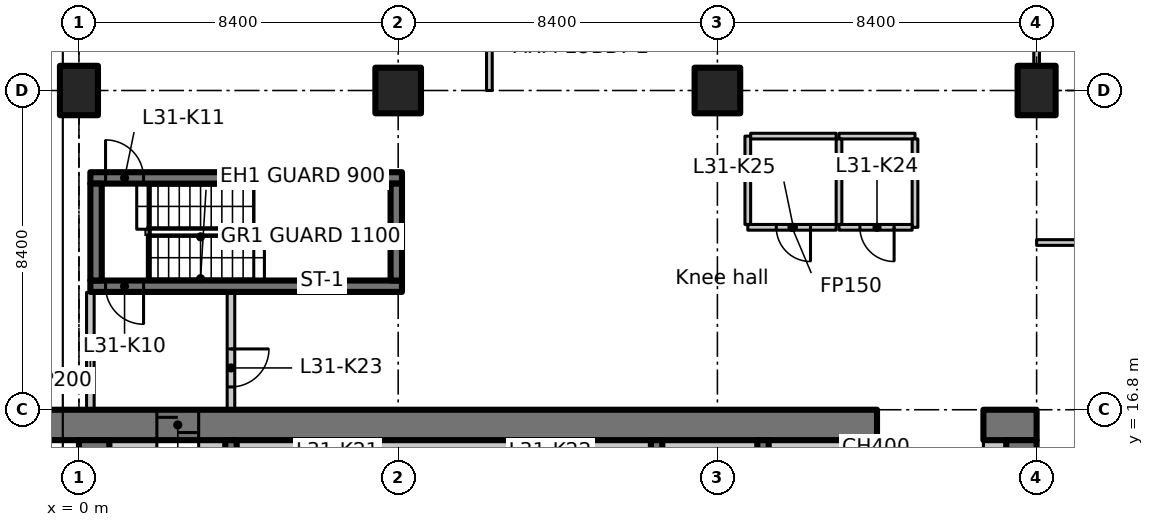
"""IFC4 building model, lengths in metres.
Left out: names, types, materials, properties, quantities, classifications, styles, units other than length and angle.
Written with IfcOpenShell. Run it as: python <this file> out.ifc"""

import sys

from ifc_helpers import new_model, si_unit, direction, frame, frame_2d, origin, origin_2d, place, context, subcontext, project, spatial, polyline, rectangle, outline, extrude, element, fill, save


model = new_model("IFC4")
c1 = context("Model", 3, precision=1e-05, world=origin(), true_north=direction((0.0, 1.0)))
c2 = subcontext(c1, "Body", "Model", "MODEL_VIEW")
j1 = project(units=[si_unit("LENGTHUNIT", "METRE"), si_unit("PLANEANGLEUNIT", "RADIAN")], contexts=[c1])
p1 = place(None, origin())
s1 = spatial("IfcSite", under=j1, at=p1, CompositionType="ELEMENT")
p2 = place(p1, origin())
s2 = spatial("IfcBuilding", under=s1, at=p2, CompositionType="ELEMENT")
p3 = place(p2, frame((0.0, 0.0, 127.7)))
s3 = spatial("IfcBuildingStorey", under=s2, at=p3, CompositionType="ELEMENT", Elevation=127.7)
p4 = place(p3, frame((0.0, 25.2, 0.0), z_axis=(0.0, 0.0, 1.0), x_axis=(1.0, 0.0, 0.0)))
e1 = element("IfcColumn", 1, at=p4, inside=s3, PredefinedType="COLUMN", context=c2, shape_type="SweptSolid", body=[
    extrude(rectangle(XDim=1.0, YDim=1.3, at=origin_2d()), origin(), (0.0, 0.0, 1.0), 3.35),
])
for number, where, z_axis, x_axis in (
    (2, (8.4, 25.2, 0.0), (0.0, 0.0, 1.0), (1.0, 0.0, 0.0)),
    (3, (16.8, 25.2, 0.0), (0.0, 0.0, 1.0), (1.0, 0.0, 0.0)),
):
    element("IfcColumn", number, at=place(p3, frame(where, z_axis=z_axis, x_axis=x_axis)), inside=s3, PredefinedType="COLUMN", context=c2, shape_type="SweptSolid", body=[
        extrude(rectangle(XDim=1.2, YDim=1.2, at=origin_2d()), origin(), (0.0, 0.0, 1.0), 3.35),
    ])
p5 = place(p3, frame((25.2, 25.2, 0.0), z_axis=(0.0, 0.0, 1.0), x_axis=(1.0, 0.0, 0.0)))
e4 = element("IfcColumn", 4, at=p5, inside=s3, PredefinedType="COLUMN", context=c2, shape_type="SweptSolid", body=[
    extrude(rectangle(XDim=1.0, YDim=1.3, at=origin_2d()), origin(), (0.0, 0.0, 1.0), 3.35),
])
p6 = place(p3, frame((-1.1, 16.4, 0.0), z_axis=(0.0, 0.0, 1.0), x_axis=(1.0, 0.0, 0.0)))
e5 = element("IfcWall", 5, at=p6, inside=s3, PredefinedType="SHEAR", context=c2, shape_type="SweptSolid", body=[
    extrude(rectangle(XDim=22.1, YDim=0.8, at=frame_2d((11.05, 0.0))), origin(), (0.0, 0.0, 1.0), 3.35),
])
p7 = place(p6, frame((3.15, 0.0, 0.0)))
e6 = element("IfcOpeningElement", 6, at=p7, cuts=e5, PredefinedType="OPENING", context=c2, shape_type="SweptSolid", body=[
    extrude(rectangle(XDim=1.1, YDim=2.3, at=frame_2d((0.55, 1.15))), frame((0.0, 0.41, 0.0), z_axis=(0.0, -1.0, 0.0), x_axis=(1.0, 0.0, 0.0)), (0.0, 0.0, 1.0), 0.82),
])
p8 = place(p3, frame((23.8, 16.4, 0.0), z_axis=(0.0, 0.0, 1.0), x_axis=(1.0, 0.0, 0.0)))
e7 = element("IfcWall", 7, at=p8, inside=s3, PredefinedType="SHEAR", context=c2, shape_type="SweptSolid", body=[
    extrude(rectangle(XDim=1.4, YDim=0.8, at=frame_2d((0.7, 0.0))), origin(), (0.0, 0.0, 1.0), 3.35),
])
p9 = place(p3, frame((0.4, 7.136, 0.0), z_axis=(0.0, 0.0, 1.0), x_axis=(0.0, 1.0, 0.0)))
e8 = element("IfcWall", 8, at=p9, inside=s3, PredefinedType="SHEAR", context=c2, shape_type="SweptSolid", body=[
    extrude(rectangle(XDim=8.864, YDim=0.8, at=frame_2d((4.432, 0.0))), origin(), (0.0, 0.0, 1.0), 3.35),
])
p10 = place(p3, frame((24.8, 12.6, 0.0), z_axis=(0.0, 0.0, 1.0), x_axis=(0.0, 1.0, 0.0)))
e9 = element("IfcWall", 9, at=p10, inside=s3, PredefinedType="SHEAR", context=c2, shape_type="SweptSolid", body=[
    extrude(rectangle(XDim=3.4, YDim=0.8, at=frame_2d((1.7, 0.0))), origin(), (0.0, 0.0, 1.0), 3.35),
])
p11 = place(p3, frame((0.8, 15.8, 0.0), z_axis=(0.0, 0.0, 1.0), x_axis=(1.0, 0.0, 0.0)))
e10 = element("IfcWall", 10, at=p11, inside=s3, PredefinedType="PARTITIONING", context=c2, shape_type="SweptSolid", body=[
    extrude(rectangle(XDim=1.25, YDim=0.4, at=frame_2d((0.625, 0.0))), origin(), (0.0, 0.0, 1.0), 3.35),
])
p12 = place(p3, frame((23.8, 15.8, 0.0), z_axis=(0.0, 0.0, 1.0), x_axis=(1.0, 0.0, 0.0)))
e11 = element("IfcWall", 11, at=p12, inside=s3, PredefinedType="PARTITIONING", context=c2, shape_type="SweptSolid", body=[
    extrude(rectangle(XDim=0.6, YDim=0.4, at=frame_2d((0.3, 0.0))), origin(), (0.0, 0.0, 1.0), 3.35),
])
for number, where, z_axis, x_axis in (
    (12, (4.0, 12.95, 0.0), (0.0, 0.0, 1.0), (0.0, 1.0, 0.0)),
    (13, (15.2, 12.95, 0.0), (0.0, 0.0, 1.0), (0.0, 1.0, 0.0)),
    (14, (18.0, 12.95, 0.0), (0.0, 0.0, 1.0), (0.0, 1.0, 0.0)),
    (15, (20.8, 12.95, 0.0), (0.0, 0.0, 1.0), (0.0, 1.0, 0.0)),
):
    element("IfcWall", number, at=place(p3, frame(where, z_axis=z_axis, x_axis=x_axis)), inside=s3, PredefinedType="SHEAR", context=c2, shape_type="SweptSolid", body=[
        extrude(rectangle(XDim=3.05, YDim=0.3, at=frame_2d((1.525, 0.0))), origin(), (0.0, 0.0, 1.0), 3.35),
    ])
p13 = place(p3, frame((8.5, 20.05, 0.0), z_axis=(0.0, 0.0, 1.0), x_axis=(-1.0, 0.0, 0.0)))
e16 = element("IfcWall", 16, at=p13, inside=s3, PredefinedType="SHEAR", context=c2, shape_type="SweptSolid", body=[
    extrude(rectangle(XDim=8.2, YDim=0.3, at=frame_2d((4.1, 0.0))), origin(), (0.0, 0.0, 1.0), 3.35),
])
p14 = place(p13, frame((6.8, 0.0, 0.0)))
e17 = element("IfcOpeningElement", 17, at=p14, cuts=e16, PredefinedType="OPENING", context=c2, shape_type="SweptSolid", body=[
    extrude(rectangle(XDim=1.0, YDim=2.1, at=frame_2d((0.5, 1.05))), frame((0.0, 0.16, 0.0), z_axis=(0.0, -1.0, 0.0), x_axis=(1.0, 0.0, 0.0)), (0.0, 0.0, 1.0), 0.32),
])
p15 = place(p3, frame((0.3, 22.9, 0.0), z_axis=(0.0, 0.0, 1.0), x_axis=(1.0, 0.0, 0.0)))
e18 = element("IfcWall", 18, at=p15, inside=s3, PredefinedType="SHEAR", context=c2, shape_type="SweptSolid", body=[
    extrude(rectangle(XDim=8.2, YDim=0.3, at=frame_2d((4.1, 0.0))), origin(), (0.0, 0.0, 1.0), 3.35),
])
p16 = place(p15, frame((0.4, 0.0, 0.0)))
e19 = element("IfcOpeningElement", 19, at=p16, cuts=e18, PredefinedType="OPENING", context=c2, shape_type="SweptSolid", body=[
    extrude(rectangle(XDim=1.0, YDim=2.1, at=frame_2d((0.5, 1.05))), frame((0.0, 0.16, 0.0), z_axis=(0.0, -1.0, 0.0), x_axis=(1.0, 0.0, 0.0)), (0.0, 0.0, 1.0), 0.32),
])
for number, where, z_axis, x_axis in (
    (20, (0.45, 20.2, 0.0), (0.0, 0.0, 1.0), (0.0, 1.0, 0.0)),
    (21, (8.35, 20.2, 0.0), (0.0, 0.0, 1.0), (0.0, 1.0, 0.0)),
):
    element("IfcWall", number, at=place(p3, frame(where, z_axis=z_axis, x_axis=x_axis)), inside=s3, PredefinedType="SHEAR", context=c2, shape_type="SweptSolid", body=[
        extrude(rectangle(XDim=2.55, YDim=0.3, at=frame_2d((1.275, 0.0))), origin(), (0.0, 0.0, 1.0), 3.35),
    ])
p17 = place(p3, frame((0.3, 16.812, 0.0), z_axis=(0.0, 0.0, 1.0), x_axis=(0.0, 1.0, 0.0)))
e22 = element("IfcWall", 22, at=p17, inside=s3, PredefinedType="PARTITIONING", context=c2, shape_type="SweptSolid", body=[
    extrude(rectangle(XDim=3.076, YDim=0.2, at=frame_2d((1.538, 0.0))), origin(), (0.0, 0.0, 1.0), 2.98),
])
p18 = place(p3, frame((4.0, 19.888, 0.0), z_axis=(0.0, 0.0, 1.0), x_axis=(0.0, -1.0, 0.0)))
e23 = element("IfcWall", 23, at=p18, inside=s3, PredefinedType="PARTITIONING", context=c2, shape_type="SweptSolid", body=[
    extrude(rectangle(XDim=3.076, YDim=0.2, at=frame_2d((1.538, 0.0))), origin(), (0.0, 0.0, 1.0), 3.35),
])
p19 = place(p18, frame((1.488, 0.0, 0.0)))
e24 = element("IfcOpeningElement", 24, at=p19, cuts=e23, PredefinedType="OPENING", context=c2, shape_type="SweptSolid", body=[
    extrude(rectangle(XDim=1.0, YDim=2.1, at=frame_2d((0.5, 1.05))), frame((0.0, 0.11, 0.0), z_axis=(0.0, -1.0, 0.0), x_axis=(1.0, 0.0, 0.0)), (0.0, 0.0, 1.0), 0.22),
])
p20 = place(p3, frame((20.0, 24.0, 0.0), z_axis=(0.0, 0.0, 1.0), x_axis=(1.0, 0.0, 0.0)))
e25 = element("IfcWall", 25, at=p20, inside=s3, PredefinedType="PARTITIONING", context=c2, shape_type="SweptSolid", body=[
    extrude(rectangle(XDim=2.0, YDim=0.15, at=frame_2d((1.0, 0.0))), origin(), (0.0, 0.0, 1.0), 3.35),
])
p21 = place(p3, frame((22.0, 23.925, 0.0), z_axis=(0.0, 0.0, 1.0), x_axis=(0.0, -1.0, 0.0)))
e26 = element("IfcWall", 26, at=p21, inside=s3, PredefinedType="PARTITIONING", context=c2, shape_type="SweptSolid", body=[
    extrude(rectangle(XDim=2.325, YDim=0.15, at=frame_2d((1.163, 0.0))), origin(), (0.0, 0.0, 1.0), 3.35),
])
p22 = place(p3, frame((21.925, 21.6, 0.0), z_axis=(0.0, 0.0, 1.0), x_axis=(-1.0, 0.0, 0.0)))
e27 = element("IfcWall", 27, at=p22, inside=s3, PredefinedType="PARTITIONING", context=c2, shape_type="SweptSolid", body=[
    extrude(rectangle(XDim=1.925, YDim=0.15, at=frame_2d((0.962, 0.0))), origin(), (0.0, 0.0, 1.0), 3.35),
])
p23 = place(p22, frame((0.475, 0.0, 0.0)))
e28 = element("IfcOpeningElement", 28, at=p23, cuts=e27, PredefinedType="OPENING", context=c2, shape_type="SweptSolid", body=[
    extrude(rectangle(XDim=0.9, YDim=2.1, at=frame_2d((0.45, 1.05))), frame((0.0, 0.085, 0.0), z_axis=(0.0, -1.0, 0.0), x_axis=(1.0, 0.0, 0.0)), (0.0, 0.0, 1.0), 0.17),
])
p24 = place(p3, frame((20.0, 21.675, 0.0), z_axis=(0.0, 0.0, 1.0), x_axis=(0.0, 1.0, 0.0)))
e29 = element("IfcWall", 29, at=p24, inside=s3, PredefinedType="PARTITIONING", context=c2, shape_type="SweptSolid", body=[
    extrude(rectangle(XDim=2.25, YDim=0.15, at=frame_2d((1.125, 0.0))), origin(), (0.0, 0.0, 1.0), 3.35),
])
p25 = place(p3, frame((19.925, 21.6, 0.0), z_axis=(0.0, 0.0, 1.0), x_axis=(-1.0, 0.0, 0.0)))
e30 = element("IfcWall", 30, at=p25, inside=s3, PredefinedType="PARTITIONING", context=c2, shape_type="SweptSolid", body=[
    extrude(rectangle(XDim=2.325, YDim=0.15, at=frame_2d((1.163, 0.0))), origin(), (0.0, 0.0, 1.0), 3.35),
])
p26 = place(p25, frame((0.675, 0.0, 0.0)))
e31 = element("IfcOpeningElement", 31, at=p26, cuts=e30, PredefinedType="OPENING", context=c2, shape_type="SweptSolid", body=[
    extrude(rectangle(XDim=0.9, YDim=2.1, at=frame_2d((0.45, 1.05))), frame((0.0, 0.085, 0.0), z_axis=(0.0, -1.0, 0.0), x_axis=(1.0, 0.0, 0.0)), (0.0, 0.0, 1.0), 0.17),
])
p27 = place(p3, frame((17.6, 21.675, 0.0), z_axis=(0.0, 0.0, 1.0), x_axis=(0.0, 1.0, 0.0)))
e32 = element("IfcWall", 32, at=p27, inside=s3, PredefinedType="PARTITIONING", context=c2, shape_type="SweptSolid", body=[
    extrude(rectangle(XDim=2.325, YDim=0.15, at=frame_2d((1.163, 0.0))), origin(), (0.0, 0.0, 1.0), 3.35),
])
p28 = place(p3, frame((17.675, 24.0, 0.0), z_axis=(0.0, 0.0, 1.0), x_axis=(1.0, 0.0, 0.0)))
e33 = element("IfcWall", 33, at=p28, inside=s3, PredefinedType="PARTITIONING", context=c2, shape_type="SweptSolid", body=[
    extrude(rectangle(XDim=2.25, YDim=0.15, at=frame_2d((1.125, 0.0))), origin(), (0.0, 0.0, 1.0), 3.35),
])
p29 = place(p3, frame((3.15, 15.8, 0.0), z_axis=(0.0, 0.0, 1.0), x_axis=(1.0, 0.0, 0.0)))
e34 = element("IfcWall", 34, at=p29, inside=s3, PredefinedType="PARTITIONING", context=c2, shape_type="SweptSolid", body=[
    extrude(rectangle(XDim=0.7, YDim=0.4, at=frame_2d((0.35, 0.0))), origin(), (0.0, 0.0, 1.0), 3.35),
])
p30 = place(p3, frame((4.15, 15.8, 0.0), z_axis=(0.0, 0.0, 1.0), x_axis=(1.0, 0.0, 0.0)))
e35 = element("IfcWall", 35, at=p30, inside=s3, PredefinedType="PARTITIONING", context=c2, shape_type="SweptSolid", body=[
    extrude(rectangle(XDim=10.9, YDim=0.4, at=frame_2d((5.45, 0.0))), origin(), (0.0, 0.0, 1.0), 3.35),
])
for number, where, z_axis, x_axis in (
    (36, (15.35, 15.8, 0.0), (0.0, 0.0, 1.0), (1.0, 0.0, 0.0)),
    (37, (18.15, 15.8, 0.0), (0.0, 0.0, 1.0), (1.0, 0.0, 0.0)),
):
    element("IfcWall", number, at=place(p3, frame(where, z_axis=z_axis, x_axis=x_axis)), inside=s3, PredefinedType="PARTITIONING", context=c2, shape_type="SweptSolid", body=[
        extrude(rectangle(XDim=2.5, YDim=0.4, at=frame_2d((1.25, 0.0))), origin(), (0.0, 0.0, 1.0), 3.35),
    ])
p31 = place(p3, frame((20.95, 15.8, 0.0), z_axis=(0.0, 0.0, 1.0), x_axis=(1.0, 0.0, 0.0)))
e38 = element("IfcWall", 38, at=p31, inside=s3, PredefinedType="PARTITIONING", context=c2, shape_type="SweptSolid", body=[
    extrude(rectangle(XDim=0.05, YDim=0.4, at=frame_2d((0.025, 0.0))), origin(), (0.0, 0.0, 1.0), 3.35),
])
p32 = place(p3, frame((25.2, 21.2, 0.0), z_axis=(0.0, 0.0, 1.0), x_axis=(1.0, 0.0, 0.0)))
e39 = element("IfcWall", 39, at=p32, inside=s3, PredefinedType="PARTITIONING", context=c2, shape_type="SweptSolid", body=[
    extrude(rectangle(XDim=4.2, YDim=0.15, at=frame_2d((2.1, 0.0))), origin(), (0.0, 0.0, 1.0), 3.33),
])
p33 = place(p3, frame((25.2, 31.0, 0.0), z_axis=(0.0, 0.0, 1.0), x_axis=(0.0, -1.0, 0.0)))
e40 = element("IfcWall", 40, at=p33, inside=s3, PredefinedType="PARTITIONING", context=c2, shape_type="SweptSolid", body=[
    extrude(outline(polyline([(0.0, 0.0), (5.13, 0.0), (5.13, 2.98), (0.0, 2.98), (0.0, 0.0)])), frame((0.0, 0.075, 0.0), z_axis=(0.0, -1.0, 0.0), x_axis=(1.0, 0.0, 0.0)), (0.0, 0.0, 1.0), 0.15),
])
p34 = place(p33, frame((1.93, 0.0, 0.0)))
e41 = element("IfcOpeningElement", 41, at=p34, cuts=e40, PredefinedType="OPENING", context=c2, shape_type="SweptSolid", body=[
    extrude(rectangle(XDim=1.1, YDim=2.1, at=frame_2d((0.55, 1.05))), frame((0.0, 0.085, 0.0), z_axis=(0.0, -1.0, 0.0), x_axis=(1.0, 0.0, 0.0)), (0.0, 0.0, 1.0), 0.17),
])
p35 = place(p3, frame((10.8, 25.2, 0.0), z_axis=(0.0, 0.0, 1.0), x_axis=(0.0, 1.0, 0.0)))
e42 = element("IfcWall", 42, at=p35, inside=s3, PredefinedType="PARTITIONING", context=c2, shape_type="SweptSolid", body=[
    extrude(rectangle(XDim=8.4, YDim=0.15, at=frame_2d((4.2, 0.0))), origin(), (0.0, 0.0, 1.0), 3.33),
])
p36 = place(p35, frame((3.3, 0.0, 0.0)))
e43 = element("IfcOpeningElement", 43, at=p36, cuts=e42, PredefinedType="OPENING", context=c2, shape_type="SweptSolid", body=[
    extrude(rectangle(XDim=1.6, YDim=2.1, at=frame_2d((0.8, 1.05))), frame((0.0, 0.085, 0.0), z_axis=(0.0, -1.0, 0.0), x_axis=(1.0, 0.0, 0.0)), (0.0, 0.0, 1.0), 0.17),
])
p37 = place(p7, origin())
e44 = element("IfcDoor", 44, at=p37, inside=s3, OperationType="SLIDING_TO_LEFT", PredefinedType="DOOR", context=c2, shape_type="SweptSolid", body=[
    extrude(rectangle(XDim=1.1, YDim=2.3, at=frame_2d((0.55, 1.15))), frame((0.0, 0.025, 0.0), z_axis=(0.0, -1.0, 0.0), x_axis=(1.0, 0.0, 0.0)), (0.0, 0.0, 1.0), 0.05),
])
fill(e6, e44)
p38 = place(p14, origin())
e45 = element("IfcDoor", 45, at=p38, inside=s3, OperationType="SINGLE_SWING_LEFT", PredefinedType="DOOR", context=c2, shape_type="SweptSolid", body=[
    extrude(rectangle(XDim=1.0, YDim=2.1, at=frame_2d((0.5, 1.05))), frame((0.0, 0.025, 0.0), z_axis=(0.0, -1.0, 0.0), x_axis=(1.0, 0.0, 0.0)), (0.0, 0.0, 1.0), 0.05),
])
fill(e17, e45)
p39 = place(p16, origin())
e46 = element("IfcDoor", 46, at=p39, inside=s3, OperationType="SINGLE_SWING_RIGHT", PredefinedType="DOOR", context=c2, shape_type="SweptSolid", body=[
    extrude(rectangle(XDim=1.0, YDim=2.1, at=frame_2d((0.5, 1.05))), frame((0.0, 0.025, 0.0), z_axis=(0.0, -1.0, 0.0), x_axis=(1.0, 0.0, 0.0)), (0.0, 0.0, 1.0), 0.05),
])
fill(e19, e46)
p40 = place(p19, origin())
e47 = element("IfcDoor", 47, at=p40, inside=s3, OperationType="SINGLE_SWING_RIGHT", PredefinedType="DOOR", context=c2, shape_type="SweptSolid", body=[
    extrude(rectangle(XDim=1.0, YDim=2.1, at=frame_2d((0.5, 1.05))), frame((0.0, 0.025, 0.0), z_axis=(0.0, -1.0, 0.0), x_axis=(1.0, 0.0, 0.0)), (0.0, 0.0, 1.0), 0.05),
])
fill(e24, e47)
p41 = place(p23, origin())
e48 = element("IfcDoor", 48, at=p41, inside=s3, OperationType="SINGLE_SWING_LEFT", PredefinedType="DOOR", context=c2, shape_type="SweptSolid", body=[
    extrude(rectangle(XDim=0.9, YDim=2.1, at=frame_2d((0.45, 1.05))), frame((0.0, 0.025, 0.0), z_axis=(0.0, -1.0, 0.0), x_axis=(1.0, 0.0, 0.0)), (0.0, 0.0, 1.0), 0.05),
])
fill(e28, e48)
p42 = place(p26, origin())
e49 = element("IfcDoor", 49, at=p42, inside=s3, OperationType="SINGLE_SWING_RIGHT", PredefinedType="DOOR", context=c2, shape_type="SweptSolid", body=[
    extrude(rectangle(XDim=0.9, YDim=2.1, at=frame_2d((0.45, 1.05))), frame((0.0, 0.025, 0.0), z_axis=(0.0, -1.0, 0.0), x_axis=(1.0, 0.0, 0.0)), (0.0, 0.0, 1.0), 0.05),
])
fill(e31, e49)
save(model, sys.argv[1])
